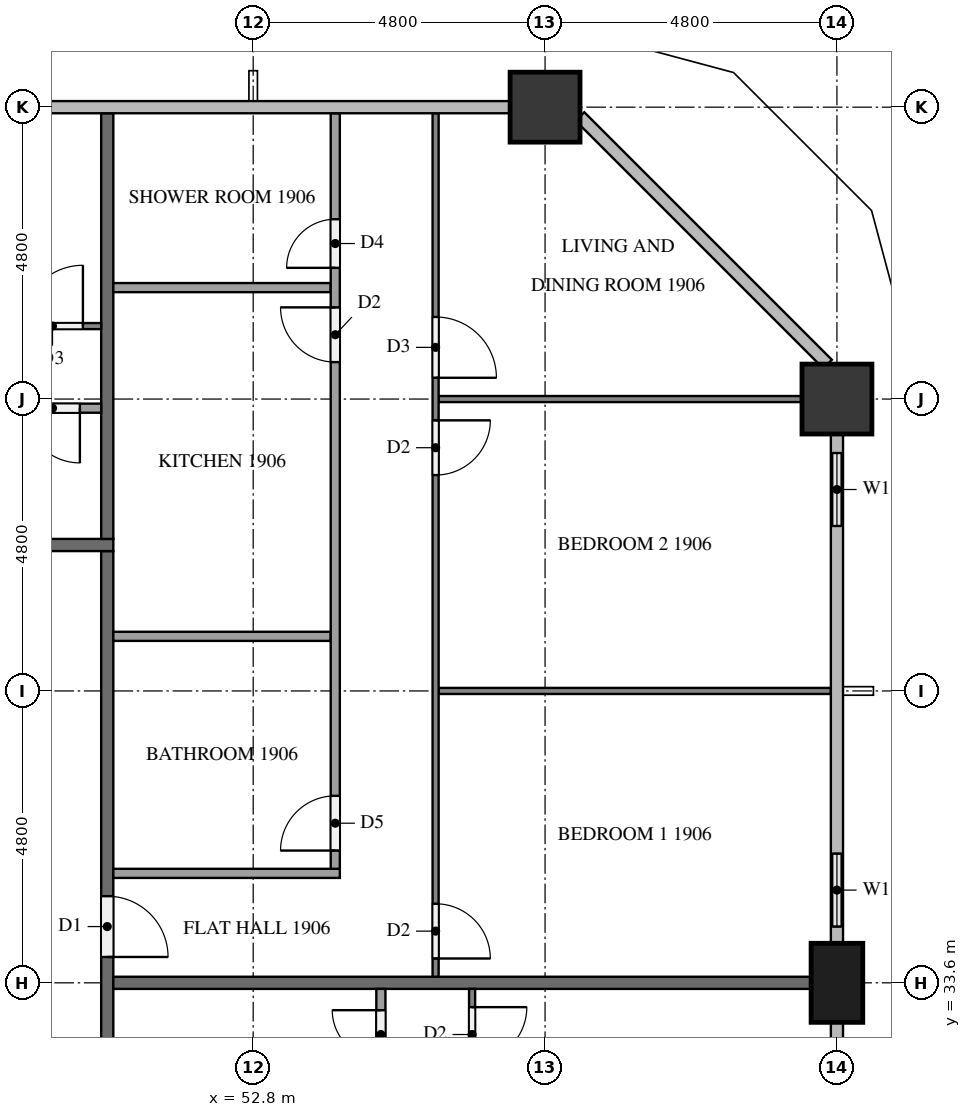
"""IFC4 building model, lengths in metres.
Left out: names, types, materials, properties, quantities, classifications, styles, units other than length and angle.
Written with IfcOpenShell. Run it as: python <this file> out.ifc"""

import sys

from ifc_helpers import new_model, si_unit, direction, frame, frame_2d, origin, origin_2d, place, context, subcontext, project, spatial, rectangle, extrude, element, fill, save


model = new_model("IFC4")
c1 = context("Model", 3, precision=1e-05, world=origin(), true_north=direction((0.0, 1.0)))
c2 = subcontext(c1, "Body", "Model", "MODEL_VIEW")
j1 = project(units=[si_unit("LENGTHUNIT", "METRE"), si_unit("PLANEANGLEUNIT", "RADIAN")], contexts=[c1])
p1 = place(None, origin())
s1 = spatial("IfcSite", under=j1, at=p1, CompositionType="ELEMENT")
p2 = place(p1, origin())
s2 = spatial("IfcBuilding", under=s1, at=p2, CompositionType="ELEMENT")
p3 = place(p2, frame((0.0, 0.0, 76.8)))
s3 = spatial("IfcBuildingStorey", under=s2, at=p3, CompositionType="ELEMENT", Elevation=76.8)
p4 = place(p3, frame((62.4, 33.6, 0.0), z_axis=(0.0, 0.0, 1.0), x_axis=(0.0, 1.0, 0.0)))
e1 = element("IfcColumn", 1, at=p4, inside=s3, PredefinedType="COLUMN", context=c2, shape_type="SweptSolid", body=[
    extrude(rectangle(XDim=1.3, YDim=0.85, at=origin_2d()), origin(), (0.0, 0.0, 1.0), 3.2),
])
for number, where, z_axis, x_axis in (
    (2, (62.4, 43.2, 0.0), (0.0, 0.0, 1.0), (1.0, 0.0, 0.0)),
    (3, (57.6, 48.0, 0.0), (0.0, 0.0, 1.0), (1.0, 0.0, 0.0)),
):
    element("IfcColumn", number, at=place(p3, frame(where, z_axis=z_axis, x_axis=x_axis)), inside=s3, PredefinedType="COLUMN", context=c2, shape_type="SweptSolid", body=[
        extrude(rectangle(XDim=1.15, YDim=1.15, at=origin_2d()), origin(), (0.0, 0.0, 1.0), 3.2),
    ])
p5 = place(p3, frame((62.4, 31.2, 0.0), z_axis=(0.0, 0.0, 1.0), x_axis=(0.0, 1.0, 0.0)))
e4 = element("IfcWall", 4, at=p5, inside=s3, PredefinedType="SOLIDWALL", context=c2, shape_type="SweptSolid", body=[
    extrude(rectangle(XDim=1.75, YDim=0.15, at=frame_2d((0.875, 0.0))), origin(), (0.0, 0.0, 1.0), 3.2),
])
p6 = place(p5, frame((0.275, 0.0, 0.9)))
e5 = element("IfcOpeningElement", 5, at=p6, cuts=e4, PredefinedType="OPENING", context=c2, shape_type="SweptSolid", body=[
    extrude(rectangle(XDim=1.2, YDim=1.4, at=frame_2d((0.6, 0.7))), frame((0.0, 0.085, 0.0), z_axis=(0.0, -1.0, 0.0), x_axis=(1.0, 0.0, 0.0)), (0.0, 0.0, 1.0), 0.17),
])
p7 = place(p3, frame((62.4, 34.25, 0.0), z_axis=(0.0, 0.0, 1.0), x_axis=(0.0, 1.0, 0.0)))
e6 = element("IfcWall", 6, at=p7, inside=s3, PredefinedType="SOLIDWALL", context=c2, shape_type="SweptSolid", body=[
    extrude(rectangle(XDim=1.75, YDim=0.15, at=frame_2d((0.875, 0.0))), origin(), (0.0, 0.0, 1.0), 3.2),
])
p8 = place(p7, frame((0.275, 0.0, 0.9)))
e7 = element("IfcOpeningElement", 7, at=p8, cuts=e6, PredefinedType="OPENING", context=c2, shape_type="SweptSolid", body=[
    extrude(rectangle(XDim=1.2, YDim=1.4, at=frame_2d((0.6, 0.7))), frame((0.0, 0.085, 0.0), z_axis=(0.0, -1.0, 0.0), x_axis=(1.0, 0.0, 0.0)), (0.0, 0.0, 1.0), 0.17),
])
p9 = place(p3, frame((62.4, 40.8, 0.0), z_axis=(0.0, 0.0, 1.0), x_axis=(0.0, 1.0, 0.0)))
e8 = element("IfcWall", 8, at=p9, inside=s3, PredefinedType="SOLIDWALL", context=c2, shape_type="SweptSolid", body=[
    extrude(rectangle(XDim=1.825, YDim=0.15, at=frame_2d((0.913, 0.0))), origin(), (0.0, 0.0, 1.0), 3.2),
])
p10 = place(p9, frame((0.312, 0.0, 0.9)))
e9 = element("IfcOpeningElement", 9, at=p10, cuts=e8, PredefinedType="OPENING", context=c2, shape_type="SweptSolid", body=[
    extrude(rectangle(XDim=1.2, YDim=1.4, at=frame_2d((0.6, 0.7))), frame((0.0, 0.085, 0.0), z_axis=(0.0, -1.0, 0.0), x_axis=(1.0, 0.0, 0.0)), (0.0, 0.0, 1.0), 0.17),
])
p11 = place(p3, frame((50.4, 40.7, 0.0), z_axis=(0.0, 0.0, 1.0), x_axis=(0.0, -1.0, 0.0)))
e10 = element("IfcWall", 10, at=p11, inside=s3, PredefinedType="PARTITIONING", context=c2, shape_type="SweptSolid", body=[
    extrude(rectangle(XDim=28.6, YDim=0.2, at=frame_2d((14.3, 0.0))), origin(), (0.0, 0.0, 1.0), 3.2),
])
p12 = place(p11, frame((21.875, 0.0, 0.0)))
e11 = element("IfcOpeningElement", 11, at=p12, cuts=e10, PredefinedType="OPENING", context=c2, shape_type="SweptSolid", body=[
    extrude(rectangle(XDim=1.1, YDim=2.1, at=frame_2d((0.55, 1.05))), frame((0.0, 0.11, 0.0), z_axis=(0.0, -1.0, 0.0), x_axis=(1.0, 0.0, 0.0)), (0.0, 0.0, 1.0), 0.22),
])
p13 = place(p11, frame((20.075, 0.0, 0.0)))
e12 = element("IfcOpeningElement", 12, at=p13, cuts=e10, PredefinedType="OPENING", context=c2, shape_type="SweptSolid", body=[
    extrude(rectangle(XDim=1.0, YDim=2.1, at=frame_2d((0.5, 1.05))), frame((0.0, 0.11, 0.0), z_axis=(0.0, -1.0, 0.0), x_axis=(1.0, 0.0, 0.0)), (0.0, 0.0, 1.0), 0.22),
])
p14 = place(p11, frame((5.675, 0.0, 0.0)))
e13 = element("IfcOpeningElement", 13, at=p14, cuts=e10, PredefinedType="OPENING", context=c2, shape_type="SweptSolid", body=[
    extrude(rectangle(XDim=1.0, YDim=2.1, at=frame_2d((0.5, 1.05))), frame((0.0, 0.11, 0.0), z_axis=(0.0, -1.0, 0.0), x_axis=(1.0, 0.0, 0.0)), (0.0, 0.0, 1.0), 0.22),
])
p15 = place(p3, frame((11.9, 40.8, 0.0), z_axis=(0.0, 0.0, 1.0), x_axis=(1.0, 0.0, 0.0)))
e14 = element("IfcWall", 14, at=p15, inside=s3, PredefinedType="PARTITIONING", context=c2, shape_type="SweptSolid", body=[
    extrude(rectangle(XDim=38.6, YDim=0.2, at=frame_2d((19.3, 0.0))), origin(), (0.0, 0.0, 1.0), 3.2),
])
p16 = place(p15, frame((22.125, 0.0, 0.0)))
e15 = element("IfcOpeningElement", 15, at=p16, cuts=e14, PredefinedType="OPENING", context=c2, shape_type="SweptSolid", body=[
    extrude(rectangle(XDim=1.0, YDim=2.1, at=frame_2d((0.5, 1.05))), frame((0.0, 0.11, 0.0), z_axis=(0.0, -1.0, 0.0), x_axis=(1.0, 0.0, 0.0)), (0.0, 0.0, 1.0), 0.22),
])
p17 = place(p15, frame((7.725, 0.0, 0.0)))
e16 = element("IfcOpeningElement", 16, at=p17, cuts=e14, PredefinedType="OPENING", context=c2, shape_type="SweptSolid", body=[
    extrude(rectangle(XDim=1.0, YDim=2.1, at=frame_2d((0.5, 1.05))), frame((0.0, 0.11, 0.0), z_axis=(0.0, -1.0, 0.0), x_axis=(1.0, 0.0, 0.0)), (0.0, 0.0, 1.0), 0.22),
])
p18 = place(p15, frame((5.875, 0.0, 0.0)))
e17 = element("IfcOpeningElement", 17, at=p18, cuts=e14, PredefinedType="OPENING", context=c2, shape_type="SweptSolid", body=[
    extrude(rectangle(XDim=1.0, YDim=2.1, at=frame_2d((0.5, 1.05))), frame((0.0, 0.11, 0.0), z_axis=(0.0, -1.0, 0.0), x_axis=(1.0, 0.0, 0.0)), (0.0, 0.0, 1.0), 0.22),
])
p19 = place(p3, frame((50.5, 33.6, 0.0), z_axis=(0.0, 0.0, 1.0), x_axis=(1.0, 0.0, 0.0)))
e18 = element("IfcWall", 18, at=p19, inside=s3, PredefinedType="PARTITIONING", context=c2, shape_type="SweptSolid", body=[
    extrude(rectangle(XDim=11.475, YDim=0.2, at=frame_2d((5.738, 0.0))), origin(), (0.0, 0.0, 1.0), 3.2),
])
p20 = place(p3, frame((50.4, 40.9, 0.0), z_axis=(0.0, 0.0, 1.0), x_axis=(0.0, 1.0, 0.0)))
e19 = element("IfcWall", 19, at=p20, inside=s3, PredefinedType="PARTITIONING", context=c2, shape_type="SweptSolid", body=[
    extrude(rectangle(XDim=7.0, YDim=0.2, at=frame_2d((3.5, 0.0))), origin(), (0.0, 0.0, 1.0), 3.2),
])
p21 = place(p3, frame((56.4, 33.5, 0.0), z_axis=(0.0, 0.0, 1.0), x_axis=(0.0, -1.0, 0.0)))
e20 = element("IfcWall", 20, at=p21, inside=s3, PredefinedType="PARTITIONING", context=c2, shape_type="SweptSolid", body=[
    extrude(rectangle(XDim=14.2, YDim=0.1, at=frame_2d((7.1, 0.0))), origin(), (0.0, 0.0, 1.0), 3.2),
])
p22 = place(p21, frame((9.85, 0.0, 0.0)))
e21 = element("IfcOpeningElement", 21, at=p22, cuts=e20, PredefinedType="OPENING", context=c2, shape_type="SweptSolid", body=[
    extrude(rectangle(XDim=0.9, YDim=2.1, at=frame_2d((0.45, 1.05))), frame((0.0, 0.06, 0.0), z_axis=(0.0, -1.0, 0.0), x_axis=(1.0, 0.0, 0.0)), (0.0, 0.0, 1.0), 0.12),
])
p23 = place(p21, frame((8.15, 0.0, 0.0)))
e22 = element("IfcOpeningElement", 22, at=p23, cuts=e20, PredefinedType="OPENING", context=c2, shape_type="SweptSolid", body=[
    extrude(rectangle(XDim=1.0, YDim=2.1, at=frame_2d((0.5, 1.05))), frame((0.0, 0.06, 0.0), z_axis=(0.0, -1.0, 0.0), x_axis=(1.0, 0.0, 0.0)), (0.0, 0.0, 1.0), 0.12),
])
p24 = place(p21, frame((0.3, 0.0, 0.0)))
e23 = element("IfcOpeningElement", 23, at=p24, cuts=e20, PredefinedType="OPENING", context=c2, shape_type="SweptSolid", body=[
    extrude(rectangle(XDim=0.9, YDim=2.1, at=frame_2d((0.45, 1.05))), frame((0.0, 0.06, 0.0), z_axis=(0.0, -1.0, 0.0), x_axis=(1.0, 0.0, 0.0)), (0.0, 0.0, 1.0), 0.12),
])
p25 = place(p3, frame((54.9, 21.075, 0.0), z_axis=(0.0, 0.0, 1.0), x_axis=(0.0, 1.0, 0.0)))
e24 = element("IfcWall", 24, at=p25, inside=s3, PredefinedType="PARTITIONING", context=c2, shape_type="SweptSolid", body=[
    extrude(rectangle(XDim=12.425, YDim=0.15, at=frame_2d((6.212, 0.0))), origin(), (0.0, 0.0, 1.0), 3.2),
])
p26 = place(p25, frame((4.51, 0.0, 0.0)))
e25 = element("IfcOpeningElement", 25, at=p26, cuts=e24, PredefinedType="OPENING", context=c2, shape_type="SweptSolid", body=[
    extrude(rectangle(XDim=0.9, YDim=2.1, at=frame_2d((0.45, 1.05))), frame((0.0, 0.085, 0.0), z_axis=(0.0, -1.0, 0.0), x_axis=(1.0, 0.0, 0.0)), (0.0, 0.0, 1.0), 0.17),
])
p27 = place(p25, frame((6.06, 0.0, 0.0)))
e26 = element("IfcOpeningElement", 26, at=p27, cuts=e24, PredefinedType="OPENING", context=c2, shape_type="SweptSolid", body=[
    extrude(rectangle(XDim=0.9, YDim=2.1, at=frame_2d((0.45, 1.05))), frame((0.0, 0.085, 0.0), z_axis=(0.0, -1.0, 0.0), x_axis=(1.0, 0.0, 0.0)), (0.0, 0.0, 1.0), 0.17),
])
p28 = place(p25, frame((11.275, 0.0, 0.0)))
e27 = element("IfcOpeningElement", 27, at=p28, cuts=e24, PredefinedType="OPENING", context=c2, shape_type="SweptSolid", body=[
    extrude(rectangle(XDim=0.8, YDim=2.1, at=frame_2d((0.4, 1.05))), frame((0.0, 0.085, 0.0), z_axis=(0.0, -1.0, 0.0), x_axis=(1.0, 0.0, 0.0)), (0.0, 0.0, 1.0), 0.17),
])
p29 = place(p3, frame((55.85, 38.4, 0.0), z_axis=(0.0, 0.0, 1.0), x_axis=(1.0, 0.0, 0.0)))
e28 = element("IfcWall", 28, at=p29, inside=s3, PredefinedType="PARTITIONING", context=c2, shape_type="SweptSolid", body=[
    extrude(rectangle(XDim=6.45, YDim=0.1, at=frame_2d((3.225, 0.0))), origin(), (0.0, 0.0, 1.0), 3.2),
])
p30 = place(p3, frame((55.85, 43.2, 0.0), z_axis=(0.0, 0.0, 1.0), x_axis=(1.0, 0.0, 0.0)))
e29 = element("IfcWall", 29, at=p30, inside=s3, PredefinedType="PARTITIONING", context=c2, shape_type="SweptSolid", body=[
    extrude(rectangle(XDim=5.975, YDim=0.1, at=frame_2d((2.987, 0.0))), origin(), (0.0, 0.0, 1.0), 3.2),
])
p31 = place(p3, frame((55.8, 47.9, 0.0), z_axis=(0.0, 0.0, 1.0), x_axis=(0.0, -1.0, 0.0)))
e30 = element("IfcWall", 30, at=p31, inside=s3, PredefinedType="PARTITIONING", context=c2, shape_type="SweptSolid", body=[
    extrude(rectangle(XDim=14.2, YDim=0.1, at=frame_2d((7.1, 0.0))), origin(), (0.0, 0.0, 1.0), 3.2),
])
p32 = place(p31, frame((13.0, 0.0, 0.0)))
e31 = element("IfcOpeningElement", 31, at=p32, cuts=e30, PredefinedType="OPENING", context=c2, shape_type="SweptSolid", body=[
    extrude(rectangle(XDim=0.9, YDim=2.1, at=frame_2d((0.45, 1.05))), frame((0.0, 0.06, 0.0), z_axis=(0.0, -1.0, 0.0), x_axis=(1.0, 0.0, 0.0)), (0.0, 0.0, 1.0), 0.12),
])
p33 = place(p31, frame((5.05, 0.0, 0.0)))
e32 = element("IfcOpeningElement", 32, at=p33, cuts=e30, PredefinedType="OPENING", context=c2, shape_type="SweptSolid", body=[
    extrude(rectangle(XDim=0.9, YDim=2.1, at=frame_2d((0.45, 1.05))), frame((0.0, 0.06, 0.0), z_axis=(0.0, -1.0, 0.0), x_axis=(1.0, 0.0, 0.0)), (0.0, 0.0, 1.0), 0.12),
])
p34 = place(p31, frame((3.35, 0.0, 0.0)))
e33 = element("IfcOpeningElement", 33, at=p34, cuts=e30, PredefinedType="OPENING", context=c2, shape_type="SweptSolid", body=[
    extrude(rectangle(XDim=1.0, YDim=2.1, at=frame_2d((0.5, 1.05))), frame((0.0, 0.06, 0.0), z_axis=(0.0, -1.0, 0.0), x_axis=(1.0, 0.0, 0.0)), (0.0, 0.0, 1.0), 0.12),
])
for number, where, z_axis, x_axis in (
    (34, (50.5, 39.298, 0.0), (0.0, 0.0, 1.0), (1.0, 0.0, 0.0)),
    (35, (50.5, 45.033, 0.0), (0.0, 0.0, 1.0), (1.0, 0.0, 0.0)),
):
    element("IfcWall", number, at=place(p3, frame(where, z_axis=z_axis, x_axis=x_axis)), inside=s3, PredefinedType="PARTITIONING", context=c2, shape_type="SweptSolid", body=[
        extrude(rectangle(XDim=3.575, YDim=0.15, at=frame_2d((1.788, 0.0))), origin(), (0.0, 0.0, 1.0), 3.2),
    ])
p35 = place(p3, frame((50.5, 35.4, 0.0), z_axis=(0.0, 0.0, 1.0), x_axis=(1.0, 0.0, 0.0)))
e36 = element("IfcWall", 36, at=p35, inside=s3, PredefinedType="PARTITIONING", context=c2, shape_type="SweptSolid", body=[
    extrude(rectangle(XDim=3.725, YDim=0.15, at=frame_2d((1.863, 0.0))), origin(), (0.0, 0.0, 1.0), 3.2),
])
p36 = place(p3, frame((54.15, 35.475, 0.0), z_axis=(0.0, 0.0, 1.0), x_axis=(0.0, 1.0, 0.0)))
e37 = element("IfcWall", 37, at=p36, inside=s3, PredefinedType="PARTITIONING", context=c2, shape_type="SweptSolid", body=[
    extrude(rectangle(XDim=12.425, YDim=0.15, at=frame_2d((6.212, 0.0))), origin(), (0.0, 0.0, 1.0), 3.2),
])
p37 = place(p36, frame((0.3, 0.0, 0.0)))
e38 = element("IfcOpeningElement", 38, at=p37, cuts=e37, PredefinedType="OPENING", context=c2, shape_type="SweptSolid", body=[
    extrude(rectangle(XDim=0.9, YDim=2.1, at=frame_2d((0.45, 1.05))), frame((0.0, 0.085, 0.0), z_axis=(0.0, -1.0, 0.0), x_axis=(1.0, 0.0, 0.0)), (0.0, 0.0, 1.0), 0.17),
])
p38 = place(p36, frame((8.333, 0.0, 0.0)))
e39 = element("IfcOpeningElement", 39, at=p38, cuts=e37, PredefinedType="OPENING", context=c2, shape_type="SweptSolid", body=[
    extrude(rectangle(XDim=0.9, YDim=2.1, at=frame_2d((0.45, 1.05))), frame((0.0, 0.085, 0.0), z_axis=(0.0, -1.0, 0.0), x_axis=(1.0, 0.0, 0.0)), (0.0, 0.0, 1.0), 0.17),
])
p39 = place(p36, frame((9.883, 0.0, 0.0)))
e40 = element("IfcOpeningElement", 40, at=p39, cuts=e37, PredefinedType="OPENING", context=c2, shape_type="SweptSolid", body=[
    extrude(rectangle(XDim=0.8, YDim=2.1, at=frame_2d((0.4, 1.05))), frame((0.0, 0.085, 0.0), z_axis=(0.0, -1.0, 0.0), x_axis=(1.0, 0.0, 0.0)), (0.0, 0.0, 1.0), 0.17),
])
p40 = place(p3, frame((33.7, 44.4, 0.0), z_axis=(0.0, 0.0, 1.0), x_axis=(1.0, 0.0, 0.0)))
e41 = element("IfcWall", 41, at=p40, inside=s3, PredefinedType="PARTITIONING", context=c2, shape_type="SweptSolid", body=[
    extrude(rectangle(XDim=16.6, YDim=0.1, at=frame_2d((8.3, 0.0))), origin(), (0.0, 0.0, 1.0), 3.2),
])
p41 = place(p40, frame((3.45, 0.0, 0.0)))
e42 = element("IfcOpeningElement", 42, at=p41, cuts=e41, PredefinedType="OPENING", context=c2, shape_type="SweptSolid", body=[
    extrude(rectangle(XDim=0.9, YDim=2.1, at=frame_2d((0.45, 1.05))), frame((0.0, 0.06, 0.0), z_axis=(0.0, -1.0, 0.0), x_axis=(1.0, 0.0, 0.0)), (0.0, 0.0, 1.0), 0.12),
])
p42 = place(p40, frame((5.05, 0.0, 0.0)))
e43 = element("IfcOpeningElement", 43, at=p42, cuts=e41, PredefinedType="OPENING", context=c2, shape_type="SweptSolid", body=[
    extrude(rectangle(XDim=0.9, YDim=2.1, at=frame_2d((0.45, 1.05))), frame((0.0, 0.06, 0.0), z_axis=(0.0, -1.0, 0.0), x_axis=(1.0, 0.0, 0.0)), (0.0, 0.0, 1.0), 0.12),
])
p43 = place(p40, frame((15.3, 0.0, 0.0)))
e44 = element("IfcOpeningElement", 44, at=p43, cuts=e41, PredefinedType="OPENING", context=c2, shape_type="SweptSolid", body=[
    extrude(rectangle(XDim=1.0, YDim=2.1, at=frame_2d((0.5, 1.05))), frame((0.0, 0.06, 0.0), z_axis=(0.0, -1.0, 0.0), x_axis=(1.0, 0.0, 0.0)), (0.0, 0.0, 1.0), 0.12),
])
p44 = place(p3, frame((50.3, 43.05, 0.0), z_axis=(0.0, 0.0, 1.0), x_axis=(-1.0, 0.0, 0.0)))
e45 = element("IfcWall", 45, at=p44, inside=s3, PredefinedType="PARTITIONING", context=c2, shape_type="SweptSolid", body=[
    extrude(rectangle(XDim=14.825, YDim=0.15, at=frame_2d((7.413, 0.0))), origin(), (0.0, 0.0, 1.0), 3.2),
])
p45 = place(p44, frame((11.729, 0.0, 0.0)))
e46 = element("IfcOpeningElement", 46, at=p45, cuts=e45, PredefinedType="OPENING", context=c2, shape_type="SweptSolid", body=[
    extrude(rectangle(XDim=0.8, YDim=2.1, at=frame_2d((0.4, 1.05))), frame((0.0, 0.085, 0.0), z_axis=(0.0, -1.0, 0.0), x_axis=(1.0, 0.0, 0.0)), (0.0, 0.0, 1.0), 0.17),
])
p46 = place(p44, frame((10.179, 0.0, 0.0)))
e47 = element("IfcOpeningElement", 47, at=p46, cuts=e45, PredefinedType="OPENING", context=c2, shape_type="SweptSolid", body=[
    extrude(rectangle(XDim=0.9, YDim=2.1, at=frame_2d((0.45, 1.05))), frame((0.0, 0.085, 0.0), z_axis=(0.0, -1.0, 0.0), x_axis=(1.0, 0.0, 0.0)), (0.0, 0.0, 1.0), 0.17),
])
p47 = place(p44, frame((0.35, 0.0, 0.0)))
e48 = element("IfcOpeningElement", 48, at=p47, cuts=e45, PredefinedType="OPENING", context=c2, shape_type="SweptSolid", body=[
    extrude(rectangle(XDim=0.9, YDim=2.1, at=frame_2d((0.45, 1.05))), frame((0.0, 0.085, 0.0), z_axis=(0.0, -1.0, 0.0), x_axis=(1.0, 0.0, 0.0)), (0.0, 0.0, 1.0), 0.17),
])
p48 = place(p8, origin())
e49 = element("IfcWindow", 49, at=p48, inside=s3, PartitioningType="SINGLE_PANEL", PredefinedType="WINDOW", context=c2, shape_type="SweptSolid", body=[
    extrude(rectangle(XDim=1.2, YDim=1.4, at=frame_2d((0.6, 0.7))), frame((0.0, 0.03, 0.0), z_axis=(0.0, -1.0, 0.0), x_axis=(1.0, 0.0, 0.0)), (0.0, 0.0, 1.0), 0.06),
])
fill(e7, e49)
p49 = place(p10, origin())
e50 = element("IfcWindow", 50, at=p49, inside=s3, PartitioningType="SINGLE_PANEL", PredefinedType="WINDOW", context=c2, shape_type="SweptSolid", body=[
    extrude(rectangle(XDim=1.2, YDim=1.4, at=frame_2d((0.6, 0.7))), frame((0.0, 0.03, 0.0), z_axis=(0.0, -1.0, 0.0), x_axis=(1.0, 0.0, 0.0)), (0.0, 0.0, 1.0), 0.06),
])
fill(e9, e50)
p50 = place(p14, origin())
e51 = element("IfcDoor", 51, at=p50, inside=s3, OperationType="SINGLE_SWING_RIGHT", PredefinedType="DOOR", context=c2, shape_type="SweptSolid", body=[
    extrude(rectangle(XDim=1.0, YDim=2.1, at=frame_2d((0.5, 1.05))), frame((0.0, 0.025, 0.0), z_axis=(0.0, -1.0, 0.0), x_axis=(1.0, 0.0, 0.0)), (0.0, 0.0, 1.0), 0.05),
])
fill(e13, e51)
p51 = place(p24, origin())
e52 = element("IfcDoor", 52, at=p51, inside=s3, OperationType="SINGLE_SWING_LEFT", PredefinedType="DOOR", context=c2, shape_type="SweptSolid", body=[
    extrude(rectangle(XDim=0.9, YDim=2.1, at=frame_2d((0.45, 1.05))), frame((0.0, 0.025, 0.0), z_axis=(0.0, -1.0, 0.0), x_axis=(1.0, 0.0, 0.0)), (0.0, 0.0, 1.0), 0.05),
])
fill(e23, e52)
p52 = place(p28, origin())
e53 = element("IfcDoor", 53, at=p52, inside=s3, OperationType="SINGLE_SWING_RIGHT", PredefinedType="DOOR", context=c2, shape_type="SweptSolid", body=[
    extrude(rectangle(XDim=0.8, YDim=2.1, at=frame_2d((0.4, 1.05))), frame((0.0, 0.025, 0.0), z_axis=(0.0, -1.0, 0.0), x_axis=(1.0, 0.0, 0.0)), (0.0, 0.0, 1.0), 0.05),
])
fill(e27, e53)
p53 = place(p32, origin())
e54 = element("IfcDoor", 54, at=p53, inside=s3, OperationType="SINGLE_SWING_RIGHT", PredefinedType="DOOR", context=c2, shape_type="SweptSolid", body=[
    extrude(rectangle(XDim=0.9, YDim=2.1, at=frame_2d((0.45, 1.05))), frame((0.0, 0.025, 0.0), z_axis=(0.0, -1.0, 0.0), x_axis=(1.0, 0.0, 0.0)), (0.0, 0.0, 1.0), 0.05),
])
fill(e31, e54)
p54 = place(p33, origin())
e55 = element("IfcDoor", 55, at=p54, inside=s3, OperationType="SINGLE_SWING_LEFT", PredefinedType="DOOR", context=c2, shape_type="SweptSolid", body=[
    extrude(rectangle(XDim=0.9, YDim=2.1, at=frame_2d((0.45, 1.05))), frame((0.0, 0.025, 0.0), z_axis=(0.0, -1.0, 0.0), x_axis=(1.0, 0.0, 0.0)), (0.0, 0.0, 1.0), 0.05),
])
fill(e32, e55)
p55 = place(p34, origin())
e56 = element("IfcDoor", 56, at=p55, inside=s3, OperationType="SINGLE_SWING_RIGHT", PredefinedType="DOOR", context=c2, shape_type="SweptSolid", body=[
    extrude(rectangle(XDim=1.0, YDim=2.1, at=frame_2d((0.5, 1.05))), frame((0.0, 0.025, 0.0), z_axis=(0.0, -1.0, 0.0), x_axis=(1.0, 0.0, 0.0)), (0.0, 0.0, 1.0), 0.05),
])
fill(e33, e56)
p56 = place(p37, origin())
e57 = element("IfcDoor", 57, at=p56, inside=s3, OperationType="SINGLE_SWING_LEFT", PredefinedType="DOOR", context=c2, shape_type="SweptSolid", body=[
    extrude(rectangle(XDim=0.9, YDim=2.1, at=frame_2d((0.45, 1.05))), frame((0.0, 0.025, 0.0), z_axis=(0.0, -1.0, 0.0), x_axis=(1.0, 0.0, 0.0)), (0.0, 0.0, 1.0), 0.05),
])
fill(e38, e57)
p57 = place(p38, origin())
e58 = element("IfcDoor", 58, at=p57, inside=s3, OperationType="SINGLE_SWING_RIGHT", PredefinedType="DOOR", context=c2, shape_type="SweptSolid", body=[
    extrude(rectangle(XDim=0.9, YDim=2.1, at=frame_2d((0.45, 1.05))), frame((0.0, 0.025, 0.0), z_axis=(0.0, -1.0, 0.0), x_axis=(1.0, 0.0, 0.0)), (0.0, 0.0, 1.0), 0.05),
])
fill(e39, e58)
p58 = place(p39, origin())
e59 = element("IfcDoor", 59, at=p58, inside=s3, OperationType="SINGLE_SWING_LEFT", PredefinedType="DOOR", context=c2, shape_type="SweptSolid", body=[
    extrude(rectangle(XDim=0.8, YDim=2.1, at=frame_2d((0.4, 1.05))), frame((0.0, 0.025, 0.0), z_axis=(0.0, -1.0, 0.0), x_axis=(1.0, 0.0, 0.0)), (0.0, 0.0, 1.0), 0.05),
])
fill(e40, e59)
p59 = place(p43, origin())
e60 = element("IfcDoor", 60, at=p59, inside=s3, OperationType="SINGLE_SWING_RIGHT", PredefinedType="DOOR", context=c2, shape_type="SweptSolid", body=[
    extrude(rectangle(XDim=1.0, YDim=2.1, at=frame_2d((0.5, 1.05))), frame((0.0, 0.025, 0.0), z_axis=(0.0, -1.0, 0.0), x_axis=(1.0, 0.0, 0.0)), (0.0, 0.0, 1.0), 0.05),
])
fill(e44, e60)
p60 = place(p47, origin())
e61 = element("IfcDoor", 61, at=p60, inside=s3, OperationType="SINGLE_SWING_LEFT", PredefinedType="DOOR", context=c2, shape_type="SweptSolid", body=[
    extrude(rectangle(XDim=0.9, YDim=2.1, at=frame_2d((0.45, 1.05))), frame((0.0, 0.025, 0.0), z_axis=(0.0, -1.0, 0.0), x_axis=(1.0, 0.0, 0.0)), (0.0, 0.0, 1.0), 0.05),
])
fill(e48, e61)
save(model, sys.argv[1])
